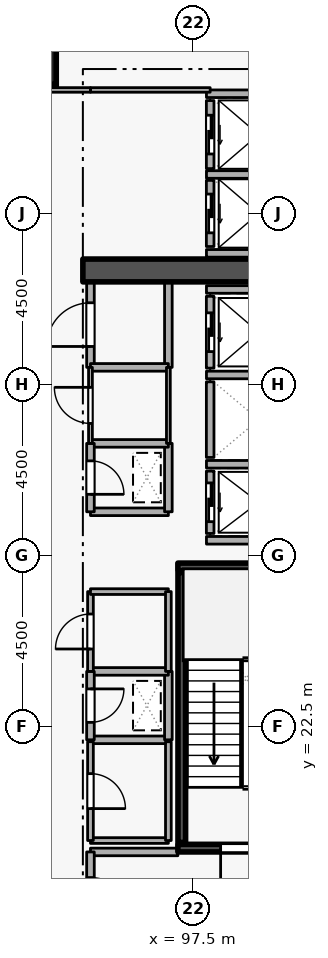
"""IFC4 building model, lengths in metres.
Left out: names, types, materials, properties, quantities, classifications, styles, units other than length and angle.
Written with IfcOpenShell. Run it as: python <this file> out.ifc"""

import sys

from ifc_helpers import new_model, si_unit, direction, frame, frame_2d, origin, origin_2d, place, context, subcontext, project, spatial, rectangle, extrude, element, fill, save


model = new_model("IFC4")
c1 = context("Model", 3, precision=1e-05, world=origin(), true_north=direction((0.0, 1.0)))
c2 = subcontext(c1, "Body", "Model", "MODEL_VIEW")
j1 = project(units=[si_unit("LENGTHUNIT", "METRE"), si_unit("PLANEANGLEUNIT", "RADIAN")], contexts=[c1])
p1 = place(None, origin())
s1 = spatial("IfcSite", under=j1, at=p1, CompositionType="ELEMENT")
p2 = place(p1, origin())
s2 = spatial("IfcBuilding", under=s1, at=p2, CompositionType="ELEMENT")
p3 = place(p2, frame((0.0, 0.0, 75.9)))
s3 = spatial("IfcBuildingStorey", under=s2, at=p3, CompositionType="ELEMENT", Elevation=75.9)
p4 = place(p3, frame((94.6, 34.5, 0.0), z_axis=(0.0, 0.0, 1.0), x_axis=(1.0, 0.0, 0.0)))
e1 = element("IfcWall", 1, at=p4, inside=s3, PredefinedType="SHEAR", context=c2, shape_type="SweptSolid", body=[
    extrude(rectangle(XDim=5.7, YDim=0.6, at=frame_2d((2.85, 0.0))), origin(), (0.0, 0.0, 1.0), 4.2),
])
p5 = place(p3, frame((93.3, 40.0, 0.0), z_axis=(0.0, 0.0, 1.0), x_axis=(1.0, 0.0, 0.0)))
e2 = element("IfcColumn", 2, at=p5, inside=s3, PredefinedType="COLUMN", context=c2, shape_type="SweptSolid", body=[
    extrude(rectangle(XDim=1.2, YDim=1.2, at=origin_2d()), origin(), (0.0, 0.0, 1.0), 4.2),
])
p6 = place(p3, frame((97.95, 29.22, 0.0), z_axis=(0.0, 0.0, 1.0), x_axis=(0.0, -1.0, 0.0)))
e3 = element("IfcWall", 3, at=p6, inside=s3, PredefinedType="STANDARD", context=c2, shape_type="SweptSolid", body=[
    extrude(rectangle(XDim=1.64, YDim=0.2, at=frame_2d((0.82, 0.0))), origin(), (0.0, 0.0, 1.0), 3.94),
])
p7 = place(p6, frame((0.31, 0.0, 0.0)))
e4 = element("IfcOpeningElement", 4, at=p7, cuts=e3, PredefinedType="OPENING", context=c2, shape_type="SweptSolid", body=[
    extrude(rectangle(XDim=1.02, YDim=2.06, at=frame_2d((0.51, 1.03))), frame((0.0, 0.11, 0.0), z_axis=(0.0, -1.0, 0.0), x_axis=(1.0, 0.0, 0.0)), (0.0, 0.0, 1.0), 0.22),
])
p8 = place(p3, frame((97.95, 31.57, 0.0), z_axis=(0.0, 0.0, 1.0), x_axis=(0.0, -1.0, 0.0)))
e5 = element("IfcWall", 5, at=p8, inside=s3, PredefinedType="STANDARD", context=c2, shape_type="SweptSolid", body=[
    extrude(rectangle(XDim=1.99, YDim=0.2, at=frame_2d((0.995, 0.0))), origin(), (0.0, 0.0, 1.0), 3.94),
])
p9 = place(p3, frame((97.95, 33.82, 0.0), z_axis=(0.0, 0.0, 1.0), x_axis=(0.0, -1.0, 0.0)))
e6 = element("IfcWall", 6, at=p9, inside=s3, PredefinedType="STANDARD", context=c2, shape_type="SweptSolid", body=[
    extrude(rectangle(XDim=1.89, YDim=0.2, at=frame_2d((0.945, 0.0))), origin(), (0.0, 0.0, 1.0), 3.94),
])
p10 = place(p9, frame((0.435, 0.0, 0.0)))
e7 = element("IfcOpeningElement", 7, at=p10, cuts=e6, PredefinedType="OPENING", context=c2, shape_type="SweptSolid", body=[
    extrude(rectangle(XDim=1.02, YDim=2.06, at=frame_2d((0.51, 1.03))), frame((0.0, 0.11, 0.0), z_axis=(0.0, -1.0, 0.0), x_axis=(1.0, 0.0, 0.0)), (0.0, 0.0, 1.0), 0.22),
])
p11 = place(p3, frame((97.95, 36.87, 0.0), z_axis=(0.0, 0.0, 1.0), x_axis=(0.0, -1.0, 0.0)))
e8 = element("IfcWall", 8, at=p11, inside=s3, PredefinedType="STANDARD", context=c2, shape_type="SweptSolid", body=[
    extrude(rectangle(XDim=1.74, YDim=0.2, at=frame_2d((0.87, 0.0))), origin(), (0.0, 0.0, 1.0), 3.94),
])
p12 = place(p11, frame((0.36, 0.0, 0.0)))
e9 = element("IfcOpeningElement", 9, at=p12, cuts=e8, PredefinedType="OPENING", context=c2, shape_type="SweptSolid", body=[
    extrude(rectangle(XDim=1.02, YDim=2.06, at=frame_2d((0.51, 1.03))), frame((0.0, 0.11, 0.0), z_axis=(0.0, -1.0, 0.0), x_axis=(1.0, 0.0, 0.0)), (0.0, 0.0, 1.0), 0.22),
])
p13 = place(p3, frame((97.95, 38.97, 0.0), z_axis=(0.0, 0.0, 1.0), x_axis=(0.0, -1.0, 0.0)))
e10 = element("IfcWall", 10, at=p13, inside=s3, PredefinedType="STANDARD", context=c2, shape_type="SweptSolid", body=[
    extrude(rectangle(XDim=1.79, YDim=0.2, at=frame_2d((0.895, 0.0))), origin(), (0.0, 0.0, 1.0), 3.94),
])
p14 = place(p13, frame((0.385, 0.0, 0.0)))
e11 = element("IfcOpeningElement", 11, at=p14, cuts=e10, PredefinedType="OPENING", context=c2, shape_type="SweptSolid", body=[
    extrude(rectangle(XDim=1.02, YDim=2.06, at=frame_2d((0.51, 1.03))), frame((0.0, 0.11, 0.0), z_axis=(0.0, -1.0, 0.0), x_axis=(1.0, 0.0, 0.0)), (0.0, 0.0, 1.0), 0.22),
])
for number, where, z_axis, x_axis in (
    (12, (97.852, 29.4, 0.0), (0.0, 0.0, 1.0), (1.0, 0.0, 0.0)),
    (13, (97.852, 27.4, 0.0), (0.0, 0.0, 1.0), (1.0, 0.0, 0.0)),
    (14, (97.852, 31.75, 0.0), (0.0, 0.0, 1.0), (1.0, 0.0, 0.0)),
    (15, (97.852, 34.0, 0.0), (0.0, 0.0, 1.0), (1.0, 0.0, 0.0)),
):
    element("IfcWall", number, at=place(p3, frame(where, z_axis=z_axis, x_axis=x_axis)), inside=s3, PredefinedType="STANDARD", context=c2, shape_type="SweptSolid", body=[
        extrude(rectangle(XDim=2.436, YDim=0.2, at=frame_2d((1.218, 0.0))), origin(), (0.0, 0.0, 1.0), 3.94),
    ])
for number, where, z_axis, x_axis in (
    (16, (97.852, 37.025, 0.0), (0.0, 0.0, 1.0), (1.0, 0.0, 0.0)),
    (17, (97.852, 34.95, 0.0), (0.0, 0.0, 1.0), (1.0, 0.0, 0.0)),
):
    element("IfcWall", number, at=place(p3, frame(where, z_axis=z_axis, x_axis=x_axis)), inside=s3, PredefinedType="STANDARD", context=c2, shape_type="SweptSolid", body=[
        extrude(rectangle(XDim=2.746, YDim=0.2, at=frame_2d((1.373, 0.0))), origin(), (0.0, 0.0, 1.0), 3.94),
    ])
p15 = place(p3, frame((97.852, 39.15, 0.0), z_axis=(0.0, 0.0, 1.0), x_axis=(1.0, 0.0, 0.0)))
e18 = element("IfcWall", 18, at=p15, inside=s3, PredefinedType="STANDARD", context=c2, shape_type="SweptSolid", body=[
    extrude(rectangle(XDim=2.636, YDim=0.2, at=frame_2d((1.318, 0.0))), origin(), (0.0, 0.0, 1.0), 3.94),
])
p16 = place(p3, frame((100.45, 19.3, 0.0), z_axis=(0.0, 0.0, 1.0), x_axis=(-1.0, 0.0, 0.0)))
e19 = element("IfcWall", 19, at=p16, inside=s3, PredefinedType="SHEAR", context=c2, shape_type="SweptSolid", body=[
    extrude(rectangle(XDim=3.35, YDim=0.2, at=frame_2d((1.675, 0.0))), origin(), (0.0, 0.0, 1.0), 4.2),
])
p17 = place(p16, frame((1.125, 0.0, 0.0)))
e20 = element("IfcOpeningElement", 20, at=p17, cuts=e19, PredefinedType="OPENING", context=c2, shape_type="SweptSolid", body=[
    extrude(rectangle(XDim=1.1, YDim=2.1, at=frame_2d((0.55, 1.05))), frame((0.0, 0.11, 0.0), z_axis=(0.0, -1.0, 0.0), x_axis=(1.0, 0.0, 0.0)), (0.0, 0.0, 1.0), 0.22),
])
p18 = place(p3, frame((97.1, 26.7, 0.0), z_axis=(0.0, 0.0, 1.0), x_axis=(1.0, 0.0, 0.0)))
e21 = element("IfcWall", 21, at=p18, inside=s3, PredefinedType="SHEAR", context=c2, shape_type="SweptSolid", body=[
    extrude(rectangle(XDim=3.35, YDim=0.2, at=frame_2d((1.675, 0.0))), origin(), (0.0, 0.0, 1.0), 4.2),
])
p19 = place(p3, frame((97.203, 26.55, 0.0), z_axis=(0.0, 0.0, 1.0), x_axis=(0.0, -1.0, 0.0)))
e22 = element("IfcWall", 22, at=p19, inside=s3, PredefinedType="SHEAR", context=c2, shape_type="SweptSolid", body=[
    extrude(rectangle(XDim=7.1, YDim=0.2, at=frame_2d((3.55, 0.0))), origin(), (0.0, 0.0, 1.0), 4.2),
])
p20 = place(p3, frame((97.1, 19.2, 0.0), z_axis=(0.0, 0.0, 1.0), x_axis=(-1.0, 0.0, 0.0)))
e23 = element("IfcWall", 23, at=p20, inside=s3, PredefinedType="STANDARD", context=c2, shape_type="SweptSolid", body=[
    extrude(rectangle(XDim=2.3, YDim=0.2, at=frame_2d((1.15, 0.0))), origin(), (0.0, 0.0, 1.0), 3.145),
])
p21 = place(p3, frame((94.8, 19.2, 0.0), z_axis=(0.0, 0.0, 1.0), x_axis=(0.0, -1.0, 0.0)))
e24 = element("IfcWall", 24, at=p21, inside=s3, PredefinedType="STANDARD", context=c2, shape_type="SweptSolid", body=[
    extrude(rectangle(XDim=2.5, YDim=0.2, at=frame_2d((1.25, 0.0))), origin(), (0.0, 0.0, 1.0), 3.94),
])
p22 = place(p21, frame((0.675, 0.0, 0.0)))
e25 = element("IfcOpeningElement", 25, at=p22, cuts=e24, PredefinedType="OPENING", context=c2, shape_type="SweptSolid", body=[
    extrude(rectangle(XDim=1.15, YDim=2.1, at=frame_2d((0.575, 1.05))), frame((0.0, 0.11, 0.0), z_axis=(0.0, -1.0, 0.0), x_axis=(1.0, 0.0, 0.0)), (0.0, 0.0, 1.0), 0.22),
])
p23 = place(p3, frame((94.8, 28.15, 0.0), z_axis=(0.0, 0.0, 1.0), x_axis=(1.0, 0.0, 0.0)))
e26 = element("IfcWall", 26, at=p23, inside=s3, PredefinedType="STANDARD", context=c2, shape_type="SweptSolid", body=[
    extrude(rectangle(XDim=2.05, YDim=0.2, at=frame_2d((1.025, 0.0))), origin(), (0.0, 0.0, 1.0), 3.94),
])
p24 = place(p3, frame((96.85, 28.15, 0.0), z_axis=(0.0, 0.0, 1.0), x_axis=(0.0, 1.0, 0.0)))
e27 = element("IfcWall", 27, at=p24, inside=s3, PredefinedType="STANDARD", context=c2, shape_type="SweptSolid", body=[
    extrude(rectangle(XDim=1.8, YDim=0.2, at=frame_2d((0.9, 0.0))), origin(), (0.0, 0.0, 1.0), 3.94),
])
p25 = place(p3, frame((96.85, 29.95, 0.0), z_axis=(0.0, 0.0, 1.0), x_axis=(-1.0, 0.0, 0.0)))
e28 = element("IfcWall", 28, at=p25, inside=s3, PredefinedType="STANDARD", context=c2, shape_type="SweptSolid", body=[
    extrude(rectangle(XDim=2.05, YDim=0.2, at=frame_2d((1.025, 0.0))), origin(), (0.0, 0.0, 1.0), 3.94),
])
p26 = place(p3, frame((94.8, 29.95, 0.0), z_axis=(0.0, 0.0, 1.0), x_axis=(0.0, -1.0, 0.0)))
e29 = element("IfcWall", 29, at=p26, inside=s3, PredefinedType="STANDARD", context=c2, shape_type="SweptSolid", body=[
    extrude(rectangle(XDim=1.8, YDim=0.2, at=frame_2d((0.9, 0.0))), origin(), (0.0, 0.0, 1.0), 3.94),
])
p27 = place(p26, frame((0.46, 0.0, 0.0)))
e30 = element("IfcOpeningElement", 30, at=p27, cuts=e29, PredefinedType="OPENING", context=c2, shape_type="SweptSolid", body=[
    extrude(rectangle(XDim=0.88, YDim=2.04, at=frame_2d((0.44, 1.02))), frame((0.0, 0.11, 0.0), z_axis=(0.0, -1.0, 0.0), x_axis=(1.0, 0.0, 0.0)), (0.0, 0.0, 1.0), 0.22),
])
p28 = place(p3, frame((94.8, 22.15, 0.0), z_axis=(0.0, 0.0, 1.0), x_axis=(1.0, 0.0, 0.0)))
e31 = element("IfcWall", 31, at=p28, inside=s3, PredefinedType="STANDARD", context=c2, shape_type="SweptSolid", body=[
    extrude(rectangle(XDim=2.05, YDim=0.2, at=frame_2d((1.025, 0.0))), origin(), (0.0, 0.0, 1.0), 3.94),
])
p29 = place(p3, frame((96.85, 22.15, 0.0), z_axis=(0.0, 0.0, 1.0), x_axis=(0.0, 1.0, 0.0)))
e32 = element("IfcWall", 32, at=p29, inside=s3, PredefinedType="STANDARD", context=c2, shape_type="SweptSolid", body=[
    extrude(rectangle(XDim=1.8, YDim=0.2, at=frame_2d((0.9, 0.0))), origin(), (0.0, 0.0, 1.0), 3.94),
])
p30 = place(p3, frame((96.85, 23.95, 0.0), z_axis=(0.0, 0.0, 1.0), x_axis=(-1.0, 0.0, 0.0)))
e33 = element("IfcWall", 33, at=p30, inside=s3, PredefinedType="STANDARD", context=c2, shape_type="SweptSolid", body=[
    extrude(rectangle(XDim=2.05, YDim=0.2, at=frame_2d((1.025, 0.0))), origin(), (0.0, 0.0, 1.0), 3.94),
])
p31 = place(p3, frame((94.8, 23.95, 0.0), z_axis=(0.0, 0.0, 1.0), x_axis=(0.0, -1.0, 0.0)))
e34 = element("IfcWall", 34, at=p31, inside=s3, PredefinedType="STANDARD", context=c2, shape_type="SweptSolid", body=[
    extrude(rectangle(XDim=1.8, YDim=0.2, at=frame_2d((0.9, 0.0))), origin(), (0.0, 0.0, 1.0), 3.94),
])
p32 = place(p31, frame((0.46, 0.0, 0.0)))
e35 = element("IfcOpeningElement", 35, at=p32, cuts=e34, PredefinedType="OPENING", context=c2, shape_type="SweptSolid", body=[
    extrude(rectangle(XDim=0.88, YDim=2.04, at=frame_2d((0.44, 1.02))), frame((0.0, 0.11, 0.0), z_axis=(0.0, -1.0, 0.0), x_axis=(1.0, 0.0, 0.0)), (0.0, 0.0, 1.0), 0.22),
])
p33 = place(p3, frame((94.8, 31.95, 0.0), z_axis=(0.0, 0.0, 1.0), x_axis=(0.0, 1.0, 0.0)))
e36 = element("IfcWall", 36, at=p33, inside=s3, PredefinedType="STANDARD", context=c2, shape_type="SweptSolid", body=[
    extrude(rectangle(XDim=2.25, YDim=0.2, at=frame_2d((1.125, 0.0))), origin(), (0.0, 0.0, 1.0), 3.94),
])
p34 = place(p33, frame((0.55, 0.0, 0.0)))
e37 = element("IfcOpeningElement", 37, at=p34, cuts=e36, PredefinedType="OPENING", context=c2, shape_type="SweptSolid", body=[
    extrude(rectangle(XDim=1.15, YDim=2.1, at=frame_2d((0.575, 1.05))), frame((0.0, 0.11, 0.0), z_axis=(0.0, -1.0, 0.0), x_axis=(1.0, 0.0, 0.0)), (0.0, 0.0, 1.0), 0.22),
])
p35 = place(p3, frame((96.85, 34.2, 0.0), z_axis=(0.0, 0.0, 1.0), x_axis=(0.0, -1.0, 0.0)))
e38 = element("IfcWall", 38, at=p35, inside=s3, PredefinedType="STANDARD", context=c2, shape_type="SweptSolid", body=[
    extrude(rectangle(XDim=2.25, YDim=0.2, at=frame_2d((1.125, 0.0))), origin(), (0.0, 0.0, 1.0), 3.94),
])
p36 = place(p3, frame((96.85, 31.95, 0.0), z_axis=(0.0, 0.0, 1.0), x_axis=(-1.0, 0.0, 0.0)))
e39 = element("IfcWall", 39, at=p36, inside=s3, PredefinedType="STANDARD", context=c2, shape_type="SweptSolid", body=[
    extrude(rectangle(XDim=2.05, YDim=0.2, at=frame_2d((1.025, 0.0))), origin(), (0.0, 0.0, 1.0), 3.94),
])
p37 = place(p3, frame((94.8, 19.5, 0.0), z_axis=(0.0, 0.0, 1.0), x_axis=(1.0, 0.0, 0.0)))
e40 = element("IfcWall", 40, at=p37, inside=s3, PredefinedType="PARTITIONING", context=c2, shape_type="SweptSolid", body=[
    extrude(rectangle(XDim=2.05, YDim=0.15, at=frame_2d((1.025, 0.0))), origin(), (0.0, 0.0, 1.0), 3.145),
])
p38 = place(p3, frame((96.85, 19.5, 0.0), z_axis=(0.0, 0.0, 1.0), x_axis=(0.0, 1.0, 0.0)))
e41 = element("IfcWall", 41, at=p38, inside=s3, PredefinedType="PARTITIONING", context=c2, shape_type="SweptSolid", body=[
    extrude(rectangle(XDim=2.6, YDim=0.15, at=frame_2d((1.3, 0.0))), origin(), (0.0, 0.0, 1.0), 3.94),
])
p39 = place(p3, frame((94.8, 22.1, 0.0), z_axis=(0.0, 0.0, 1.0), x_axis=(0.0, -1.0, 0.0)))
e42 = element("IfcWall", 42, at=p39, inside=s3, PredefinedType="PARTITIONING", context=c2, shape_type="SweptSolid", body=[
    extrude(rectangle(XDim=2.6, YDim=0.15, at=frame_2d((1.3, 0.0))), origin(), (0.0, 0.0, 1.0), 3.94),
])
p40 = place(p39, frame((0.84, 0.0, 0.0)))
e43 = element("IfcOpeningElement", 43, at=p40, cuts=e42, PredefinedType="OPENING", context=c2, shape_type="SweptSolid", body=[
    extrude(rectangle(XDim=0.92, YDim=2.08, at=frame_2d((0.46, 1.04))), frame((0.0, 0.085, 0.0), z_axis=(0.0, -1.0, 0.0), x_axis=(1.0, 0.0, 0.0)), (0.0, 0.0, 1.0), 0.17),
])
p41 = place(p3, frame((94.8, 23.95, 0.0), z_axis=(0.0, 0.0, 1.0), x_axis=(0.0, 1.0, 0.0)))
e44 = element("IfcWall", 44, at=p41, inside=s3, PredefinedType="PARTITIONING", context=c2, shape_type="SweptSolid", body=[
    extrude(rectangle(XDim=2.1, YDim=0.15, at=frame_2d((1.05, 0.0))), origin(), (0.0, 0.0, 1.0), 3.94),
])
p42 = place(p41, frame((0.59, 0.0, 0.0)))
e45 = element("IfcOpeningElement", 45, at=p42, cuts=e44, PredefinedType="OPENING", context=c2, shape_type="SweptSolid", body=[
    extrude(rectangle(XDim=0.92, YDim=2.08, at=frame_2d((0.46, 1.04))), frame((0.0, 0.085, 0.0), z_axis=(0.0, -1.0, 0.0), x_axis=(1.0, 0.0, 0.0)), (0.0, 0.0, 1.0), 0.17),
])
p43 = place(p3, frame((94.8, 26.05, 0.0), z_axis=(0.0, 0.0, 1.0), x_axis=(1.0, 0.0, 0.0)))
e46 = element("IfcWall", 46, at=p43, inside=s3, PredefinedType="PARTITIONING", context=c2, shape_type="SweptSolid", body=[
    extrude(rectangle(XDim=2.05, YDim=0.15, at=frame_2d((1.025, 0.0))), origin(), (0.0, 0.0, 1.0), 3.94),
])
p44 = place(p3, frame((96.85, 26.05, 0.0), z_axis=(0.0, 0.0, 1.0), x_axis=(0.0, -1.0, 0.0)))
e47 = element("IfcWall", 47, at=p44, inside=s3, PredefinedType="PARTITIONING", context=c2, shape_type="SweptSolid", body=[
    extrude(rectangle(XDim=2.1, YDim=0.15, at=frame_2d((1.05, 0.0))), origin(), (0.0, 0.0, 1.0), 3.94),
])
p45 = place(p3, frame((94.8, 29.95, 0.0), z_axis=(0.0, 0.0, 1.0), x_axis=(0.0, 1.0, 0.0)))
e48 = element("IfcWall", 48, at=p45, inside=s3, PredefinedType="PARTITIONING", context=c2, shape_type="SweptSolid", body=[
    extrude(rectangle(XDim=2.0, YDim=0.1, at=frame_2d((1.0, 0.0))), origin(), (0.0, 0.0, 1.0), 3.94),
])
p46 = place(p45, frame((0.525, 0.0, 0.0)))
e49 = element("IfcOpeningElement", 49, at=p46, cuts=e48, PredefinedType="OPENING", context=c2, shape_type="SweptSolid", body=[
    extrude(rectangle(XDim=0.95, YDim=2.1, at=frame_2d((0.475, 1.05))), frame((0.0, 0.06, 0.0), z_axis=(0.0, -1.0, 0.0), x_axis=(1.0, 0.0, 0.0)), (0.0, 0.0, 1.0), 0.12),
])
p47 = place(p3, frame((96.85, 31.95, 0.0), z_axis=(0.0, 0.0, 1.0), x_axis=(0.0, -1.0, 0.0)))
e50 = element("IfcWall", 50, at=p47, inside=s3, PredefinedType="PARTITIONING", context=c2, shape_type="SweptSolid", body=[
    extrude(rectangle(XDim=2.0, YDim=0.1, at=frame_2d((1.0, 0.0))), origin(), (0.0, 0.0, 1.0), 3.94),
])
p48 = place(p3, frame((97.95, 39.25, 0.0), z_axis=(0.0, 0.0, 1.0), x_axis=(-1.0, 0.0, 0.0)))
e51 = element("IfcWall", 51, at=p48, inside=s3, PredefinedType="PARTITIONING", context=c2, shape_type="SweptSolid", body=[
    extrude(rectangle(XDim=3.15, YDim=0.12, at=frame_2d((1.575, 0.0))), origin(), (0.0, 0.0, 1.0), 3.94),
])
p49 = place(p3, frame((94.8, 39.25, 0.0), z_axis=(0.0, 0.0, 1.0), x_axis=(-1.0, 0.0, 0.0)))
e52 = element("IfcWall", 52, at=p49, inside=s3, PredefinedType="PARTITIONING", context=c2, shape_type="SweptSolid", body=[
    extrude(rectangle(XDim=1.85, YDim=0.12, at=frame_2d((0.925, 0.0))), origin(), (0.0, 0.0, 1.0), 3.94),
])
p50 = place(p7, origin())
e53 = element("IfcDoor", 53, at=p50, inside=s3, OperationType="SLIDING_TO_LEFT", PredefinedType="DOOR", context=c2, shape_type="SweptSolid", body=[
    extrude(rectangle(XDim=1.02, YDim=2.06, at=frame_2d((0.51, 1.03))), frame((0.0, 0.025, 0.0), z_axis=(0.0, -1.0, 0.0), x_axis=(1.0, 0.0, 0.0)), (0.0, 0.0, 1.0), 0.05),
])
fill(e4, e53)
p51 = place(p10, origin())
e54 = element("IfcDoor", 54, at=p51, inside=s3, OperationType="SLIDING_TO_LEFT", PredefinedType="DOOR", context=c2, shape_type="SweptSolid", body=[
    extrude(rectangle(XDim=1.02, YDim=2.06, at=frame_2d((0.51, 1.03))), frame((0.0, 0.025, 0.0), z_axis=(0.0, -1.0, 0.0), x_axis=(1.0, 0.0, 0.0)), (0.0, 0.0, 1.0), 0.05),
])
fill(e7, e54)
p52 = place(p12, origin())
e55 = element("IfcDoor", 55, at=p52, inside=s3, OperationType="SLIDING_TO_LEFT", PredefinedType="DOOR", context=c2, shape_type="SweptSolid", body=[
    extrude(rectangle(XDim=1.02, YDim=2.06, at=frame_2d((0.51, 1.03))), frame((0.0, 0.025, 0.0), z_axis=(0.0, -1.0, 0.0), x_axis=(1.0, 0.0, 0.0)), (0.0, 0.0, 1.0), 0.05),
])
fill(e9, e55)
p53 = place(p14, origin())
e56 = element("IfcDoor", 56, at=p53, inside=s3, OperationType="SLIDING_TO_LEFT", PredefinedType="DOOR", context=c2, shape_type="SweptSolid", body=[
    extrude(rectangle(XDim=1.02, YDim=2.06, at=frame_2d((0.51, 1.03))), frame((0.0, 0.025, 0.0), z_axis=(0.0, -1.0, 0.0), x_axis=(1.0, 0.0, 0.0)), (0.0, 0.0, 1.0), 0.05),
])
fill(e11, e56)
p54 = place(p17, origin())
e57 = element("IfcDoor", 57, at=p54, inside=s3, OperationType="SINGLE_SWING_RIGHT", PredefinedType="DOOR", context=c2, shape_type="SweptSolid", body=[
    extrude(rectangle(XDim=1.1, YDim=2.1, at=frame_2d((0.55, 1.05))), frame((0.0, 0.025, 0.0), z_axis=(0.0, -1.0, 0.0), x_axis=(1.0, 0.0, 0.0)), (0.0, 0.0, 1.0), 0.05),
])
fill(e20, e57)
p55 = place(p22, origin())
e58 = element("IfcDoor", 58, at=p55, inside=s3, OperationType="SINGLE_SWING_RIGHT", PredefinedType="DOOR", context=c2, shape_type="SweptSolid", body=[
    extrude(rectangle(XDim=1.15, YDim=2.1, at=frame_2d((0.575, 1.05))), frame((0.0, 0.025, 0.0), z_axis=(0.0, -1.0, 0.0), x_axis=(1.0, 0.0, 0.0)), (0.0, 0.0, 1.0), 0.05),
])
fill(e25, e58)
p56 = place(p27, origin())
e59 = element("IfcDoor", 59, at=p56, inside=s3, OperationType="SINGLE_SWING_RIGHT", PredefinedType="DOOR", context=c2, shape_type="SweptSolid", body=[
    extrude(rectangle(XDim=0.88, YDim=2.04, at=frame_2d((0.44, 1.02))), frame((0.0, 0.025, 0.0), z_axis=(0.0, -1.0, 0.0), x_axis=(1.0, 0.0, 0.0)), (0.0, 0.0, 1.0), 0.05),
])
fill(e30, e59)
p57 = place(p32, origin())
e60 = element("IfcDoor", 60, at=p57, inside=s3, OperationType="SINGLE_SWING_LEFT", PredefinedType="DOOR", context=c2, shape_type="SweptSolid", body=[
    extrude(rectangle(XDim=0.88, YDim=2.04, at=frame_2d((0.44, 1.02))), frame((0.0, 0.025, 0.0), z_axis=(0.0, -1.0, 0.0), x_axis=(1.0, 0.0, 0.0)), (0.0, 0.0, 1.0), 0.05),
])
fill(e35, e60)
p58 = place(p40, origin())
e61 = element("IfcDoor", 61, at=p58, inside=s3, OperationType="SINGLE_SWING_RIGHT", PredefinedType="DOOR", context=c2, shape_type="SweptSolid", body=[
    extrude(rectangle(XDim=0.92, YDim=2.08, at=frame_2d((0.46, 1.04))), frame((0.0, 0.025, 0.0), z_axis=(0.0, -1.0, 0.0), x_axis=(1.0, 0.0, 0.0)), (0.0, 0.0, 1.0), 0.05),
])
fill(e43, e61)
p59 = place(p42, origin())
e62 = element("IfcDoor", 62, at=p59, inside=s3, OperationType="SINGLE_SWING_LEFT", PredefinedType="DOOR", context=c2, shape_type="SweptSolid", body=[
    extrude(rectangle(XDim=0.92, YDim=2.08, at=frame_2d((0.46, 1.04))), frame((0.0, 0.025, 0.0), z_axis=(0.0, -1.0, 0.0), x_axis=(1.0, 0.0, 0.0)), (0.0, 0.0, 1.0), 0.05),
])
fill(e45, e62)
p60 = place(p46, origin())
e63 = element("IfcDoor", 63, at=p60, inside=s3, OperationType="SINGLE_SWING_RIGHT", PredefinedType="DOOR", context=c2, shape_type="SweptSolid", body=[
    extrude(rectangle(XDim=0.95, YDim=2.1, at=frame_2d((0.475, 1.05))), frame((0.0, 0.025, 0.0), z_axis=(0.0, -1.0, 0.0), x_axis=(1.0, 0.0, 0.0)), (0.0, 0.0, 1.0), 0.05),
])
fill(e49, e63)
p61 = place(p34, origin())
e64 = element("IfcDoor", 64, at=p61, inside=s3, OperationType="SINGLE_SWING_LEFT", PredefinedType="DOOR", context=c2, shape_type="SweptSolid", body=[
    extrude(rectangle(XDim=1.15, YDim=2.1, at=frame_2d((0.575, 1.05))), frame((0.0, 0.025, 0.0), z_axis=(0.0, -1.0, 0.0), x_axis=(1.0, 0.0, 0.0)), (0.0, 0.0, 1.0), 0.05),
])
fill(e37, e64)
save(model, sys.argv[1])
